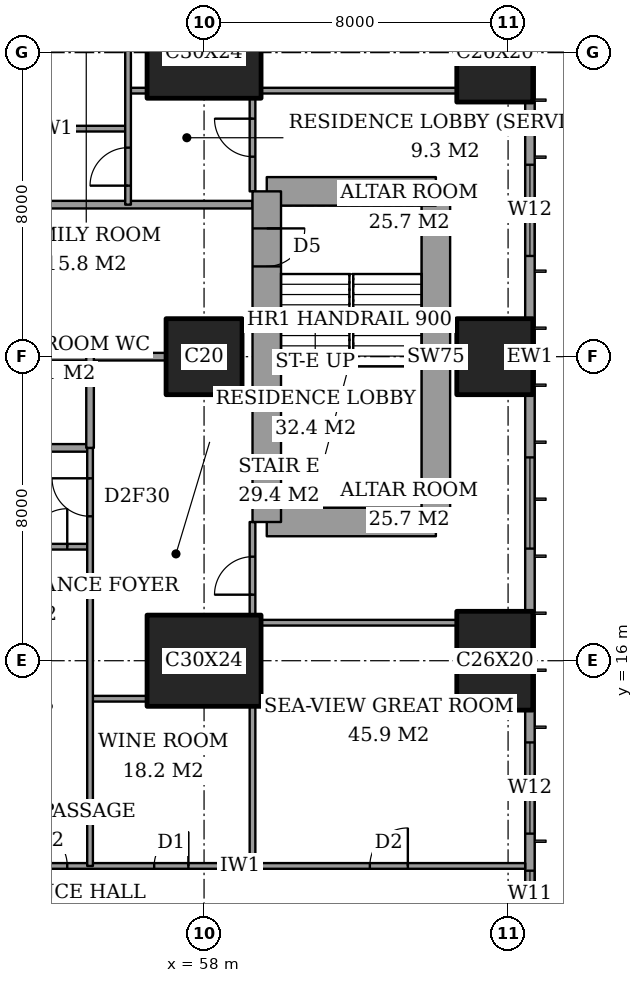
"""IFC4 building model, lengths in metres.
Left out: names, types, materials, properties, quantities, classifications, styles, units other than length and angle.
Written with IfcOpenShell. Run it as: python <this file> out.ifc"""

import sys

from ifc_helpers import new_model, si_unit, direction, frame, frame_2d, origin, origin_2d, place, context, subcontext, project, spatial, rectangle, extrude, element, fill, save


model = new_model("IFC4")
c1 = context("Model", 3, precision=1e-05, world=origin(), true_north=direction((0.0, 1.0)))
c2 = subcontext(c1, "Body", "Model", "MODEL_VIEW")
j1 = project(units=[si_unit("LENGTHUNIT", "METRE"), si_unit("PLANEANGLEUNIT", "RADIAN")], contexts=[c1])
p1 = place(None, origin())
s1 = spatial("IfcSite", under=j1, at=p1, CompositionType="ELEMENT")
p2 = place(p1, origin())
s2 = spatial("IfcBuilding", under=s1, at=p2, CompositionType="ELEMENT")
p3 = place(p2, frame((0.0, 0.0, 143.0)))
s3 = spatial("IfcBuildingStorey", under=s2, at=p3, CompositionType="ELEMENT", Elevation=143.0)
p4 = place(p3, frame((58.0, 16.0, 0.0), z_axis=(0.0, 0.0, 1.0), x_axis=(1.0, 0.0, 0.0)))
e1 = element("IfcColumn", 1, at=p4, inside=s3, PredefinedType="COLUMN", context=c2, shape_type="SweptSolid", body=[
    extrude(rectangle(XDim=3.0, YDim=2.4, at=origin_2d()), origin(), (0.0, 0.0, 1.0), 3.6),
])
p5 = place(p3, frame((58.0, 24.0, 0.0), z_axis=(0.0, 0.0, 1.0), x_axis=(1.0, 0.0, 0.0)))
e2 = element("IfcColumn", 2, at=p5, inside=s3, PredefinedType="COLUMN", context=c2, shape_type="SweptSolid", body=[
    extrude(rectangle(XDim=2.0, YDim=2.0, at=origin_2d()), origin(), (0.0, 0.0, 1.0), 3.6),
])
p6 = place(p3, frame((58.0, 32.0, 0.0), z_axis=(0.0, 0.0, 1.0), x_axis=(1.0, 0.0, 0.0)))
e3 = element("IfcColumn", 3, at=p6, inside=s3, PredefinedType="COLUMN", context=c2, shape_type="SweptSolid", body=[
    extrude(rectangle(XDim=3.0, YDim=2.4, at=origin_2d()), origin(), (0.0, 0.0, 1.0), 3.6),
])
p7 = place(p3, frame((65.65, 16.0, 0.0), z_axis=(0.0, 0.0, 1.0), x_axis=(0.0, 1.0, 0.0)))
e4 = element("IfcColumn", 4, at=p7, inside=s3, PredefinedType="COLUMN", context=c2, shape_type="SweptSolid", body=[
    extrude(rectangle(XDim=2.6, YDim=2.0, at=origin_2d()), origin(), (0.0, 0.0, 1.0), 3.6),
])
p8 = place(p3, frame((65.65, 24.0, 0.0), z_axis=(0.0, 0.0, 1.0), x_axis=(1.0, 0.0, 0.0)))
e5 = element("IfcColumn", 5, at=p8, inside=s3, PredefinedType="COLUMN", context=c2, shape_type="SweptSolid", body=[
    extrude(rectangle(XDim=2.0, YDim=2.0, at=origin_2d()), origin(), (0.0, 0.0, 1.0), 3.6),
])
p9 = place(p3, frame((65.65, 32.0, 0.0), z_axis=(0.0, 0.0, 1.0), x_axis=(0.0, 1.0, 0.0)))
e6 = element("IfcColumn", 6, at=p9, inside=s3, PredefinedType="COLUMN", context=c2, shape_type="SweptSolid", body=[
    extrude(rectangle(XDim=2.6, YDim=2.0, at=origin_2d()), origin(), (0.0, 0.0, 1.0), 3.6),
])
p10 = place(p3, frame((59.65, 19.65, 0.0), z_axis=(0.0, 0.0, 1.0), x_axis=(1.0, 0.0, 0.0)))
e7 = element("IfcWall", 7, at=p10, inside=s3, PredefinedType="SHEAR", context=c2, shape_type="SweptSolid", body=[
    extrude(rectangle(XDim=4.45, YDim=0.75, at=frame_2d((2.225, 0.0))), origin(), (0.0, 0.0, 1.0), 3.6),
])
p11 = place(p3, frame((64.1, 19.65, 0.0), z_axis=(0.0, 0.0, 1.0), x_axis=(0.0, 1.0, 0.0)))
e8 = element("IfcWall", 8, at=p11, inside=s3, PredefinedType="SHEAR", context=c2, shape_type="SweptSolid", body=[
    extrude(rectangle(XDim=8.7, YDim=0.75, at=frame_2d((4.35, 0.0))), origin(), (0.0, 0.0, 1.0), 3.6),
])
p12 = place(p3, frame((64.1, 28.35, 0.0), z_axis=(0.0, 0.0, 1.0), x_axis=(-1.0, 0.0, 0.0)))
e9 = element("IfcWall", 9, at=p12, inside=s3, PredefinedType="SHEAR", context=c2, shape_type="SweptSolid", body=[
    extrude(rectangle(XDim=4.45, YDim=0.75, at=frame_2d((2.225, 0.0))), origin(), (0.0, 0.0, 1.0), 3.6),
])
p13 = place(p3, frame((59.65, 28.35, 0.0), z_axis=(0.0, 0.0, 1.0), x_axis=(0.0, -1.0, 0.0)))
e10 = element("IfcWall", 10, at=p13, inside=s3, PredefinedType="SHEAR", context=c2, shape_type="SweptSolid", body=[
    extrude(rectangle(XDim=8.7, YDim=0.75, at=frame_2d((4.35, 0.0))), origin(), (0.0, 0.0, 1.0), 3.6),
])
p14 = place(p13, frame((0.975, 0.0, 0.0)))
e11 = element("IfcOpeningElement", 11, at=p14, cuts=e10, PredefinedType="OPENING", context=c2, shape_type="SweptSolid", body=[
    extrude(rectangle(XDim=1.0, YDim=2.1, at=frame_2d((0.5, 1.05))), frame((0.0, 0.385, 0.0), z_axis=(0.0, -1.0, 0.0), x_axis=(1.0, 0.0, 0.0)), (0.0, 0.0, 1.0), 0.77),
])
p15 = place(p3, frame((66.575, 3.175, 0.0), z_axis=(0.0, 0.0, 1.0), x_axis=(0.0, 1.0, 0.0)))
e12 = element("IfcWall", 12, at=p15, inside=s3, PredefinedType="SOLIDWALL", context=c2, shape_type="SweptSolid", body=[
    extrude(rectangle(XDim=41.65, YDim=0.25, at=frame_2d((20.825, 0.0))), origin(), (0.0, 0.0, 1.0), 3.6),
])
p16 = place(p15, frame((0.775, 0.0, 0.4)))
e13 = element("IfcOpeningElement", 13, at=p16, cuts=e12, PredefinedType="OPENING", context=c2, shape_type="SweptSolid", body=[
    extrude(rectangle(XDim=2.4, YDim=2.2, at=frame_2d((1.2, 1.1))), frame((0.0, 0.135, 0.0), z_axis=(0.0, -1.0, 0.0), x_axis=(1.0, 0.0, 0.0)), (0.0, 0.0, 1.0), 0.27),
])
p17 = place(p15, frame((6.1, 0.0, 0.4)))
e14 = element("IfcOpeningElement", 14, at=p17, cuts=e12, PredefinedType="OPENING", context=c2, shape_type="SweptSolid", body=[
    extrude(rectangle(XDim=1.2, YDim=2.2, at=frame_2d((0.6, 1.1))), frame((0.0, 0.135, 0.0), z_axis=(0.0, -1.0, 0.0), x_axis=(1.0, 0.0, 0.0)), (0.0, 0.0, 1.0), 0.27),
])
p18 = place(p15, frame((8.275, 0.0, 0.4)))
e15 = element("IfcOpeningElement", 15, at=p18, cuts=e12, PredefinedType="OPENING", context=c2, shape_type="SweptSolid", body=[
    extrude(rectangle(XDim=2.4, YDim=2.2, at=frame_2d((1.2, 1.1))), frame((0.0, 0.135, 0.0), z_axis=(0.0, -1.0, 0.0), x_axis=(1.0, 0.0, 0.0)), (0.0, 0.0, 1.0), 0.27),
])
p19 = place(p15, frame((15.775, 0.0, 0.4)))
e16 = element("IfcOpeningElement", 16, at=p19, cuts=e12, PredefinedType="OPENING", context=c2, shape_type="SweptSolid", body=[
    extrude(rectangle(XDim=2.4, YDim=2.2, at=frame_2d((1.2, 1.1))), frame((0.0, 0.135, 0.0), z_axis=(0.0, -1.0, 0.0), x_axis=(1.0, 0.0, 0.0)), (0.0, 0.0, 1.0), 0.27),
])
p20 = place(p15, frame((23.475, 0.0, 0.4)))
e17 = element("IfcOpeningElement", 17, at=p20, cuts=e12, PredefinedType="OPENING", context=c2, shape_type="SweptSolid", body=[
    extrude(rectangle(XDim=2.4, YDim=2.2, at=frame_2d((1.2, 1.1))), frame((0.0, 0.135, 0.0), z_axis=(0.0, -1.0, 0.0), x_axis=(1.0, 0.0, 0.0)), (0.0, 0.0, 1.0), 0.27),
])
p21 = place(p15, frame((30.875, 0.0, 0.4)))
e18 = element("IfcOpeningElement", 18, at=p21, cuts=e12, PredefinedType="OPENING", context=c2, shape_type="SweptSolid", body=[
    extrude(rectangle(XDim=2.4, YDim=2.2, at=frame_2d((1.2, 1.1))), frame((0.0, 0.135, 0.0), z_axis=(0.0, -1.0, 0.0), x_axis=(1.0, 0.0, 0.0)), (0.0, 0.0, 1.0), 0.27),
])
p22 = place(p15, frame((34.325, 0.0, 0.4)))
e19 = element("IfcOpeningElement", 19, at=p22, cuts=e12, PredefinedType="OPENING", context=c2, shape_type="SweptSolid", body=[
    extrude(rectangle(XDim=1.2, YDim=2.2, at=frame_2d((0.6, 1.1))), frame((0.0, 0.135, 0.0), z_axis=(0.0, -1.0, 0.0), x_axis=(1.0, 0.0, 0.0)), (0.0, 0.0, 1.0), 0.27),
])
p23 = place(p15, frame((38.475, 0.0, 0.4)))
e20 = element("IfcOpeningElement", 20, at=p23, cuts=e12, PredefinedType="OPENING", context=c2, shape_type="SweptSolid", body=[
    extrude(rectangle(XDim=2.4, YDim=2.2, at=frame_2d((1.2, 1.1))), frame((0.0, 0.135, 0.0), z_axis=(0.0, -1.0, 0.0), x_axis=(1.0, 0.0, 0.0)), (0.0, 0.0, 1.0), 0.27),
])
p24 = place(p3, frame((41.439, 10.6, 0.0), z_axis=(0.0, 0.0, 1.0), x_axis=(1.0, 0.0, 0.0)))
e21 = element("IfcWall", 21, at=p24, inside=s3, PredefinedType="PARTITIONING", context=c2, shape_type="SweptSolid", body=[
    extrude(rectangle(XDim=25.011, YDim=0.15, at=frame_2d((12.505, 0.0))), origin(), (0.0, 0.0, 1.0), 3.35),
])
p25 = place(p24, frame((11.961, 0.0, 0.0)))
e22 = element("IfcOpeningElement", 22, at=p25, cuts=e21, PredefinedType="OPENING", context=c2, shape_type="SweptSolid", body=[
    extrude(rectangle(XDim=1.0, YDim=2.1, at=frame_2d((0.5, 1.05))), frame((0.0, 0.085, 0.0), z_axis=(0.0, -1.0, 0.0), x_axis=(1.0, 0.0, 0.0)), (0.0, 0.0, 1.0), 0.17),
])
p26 = place(p24, frame((20.924, 0.0, 0.0)))
e23 = element("IfcOpeningElement", 23, at=p26, cuts=e21, PredefinedType="OPENING", context=c2, shape_type="SweptSolid", body=[
    extrude(rectangle(XDim=1.0, YDim=2.1, at=frame_2d((0.5, 1.05))), frame((0.0, 0.085, 0.0), z_axis=(0.0, -1.0, 0.0), x_axis=(1.0, 0.0, 0.0)), (0.0, 0.0, 1.0), 0.17),
])
p27 = place(p24, frame((15.249, 0.0, 0.0)))
e24 = element("IfcOpeningElement", 24, at=p27, cuts=e21, PredefinedType="OPENING", context=c2, shape_type="SweptSolid", body=[
    extrude(rectangle(XDim=0.9, YDim=2.1, at=frame_2d((0.45, 1.05))), frame((0.0, 0.085, 0.0), z_axis=(0.0, -1.0, 0.0), x_axis=(1.0, 0.0, 0.0)), (0.0, 0.0, 1.0), 0.17),
])
p28 = place(p24, frame((9.661, 0.0, 0.0)))
e25 = element("IfcOpeningElement", 25, at=p28, cuts=e21, PredefinedType="OPENING", context=c2, shape_type="SweptSolid", body=[
    extrude(rectangle(XDim=1.0, YDim=2.1, at=frame_2d((0.5, 1.05))), frame((0.0, 0.085, 0.0), z_axis=(0.0, -1.0, 0.0), x_axis=(1.0, 0.0, 0.0)), (0.0, 0.0, 1.0), 0.17),
])
p29 = place(p24, frame((7.311, 0.0, 0.0)))
e26 = element("IfcOpeningElement", 26, at=p29, cuts=e21, PredefinedType="OPENING", context=c2, shape_type="SweptSolid", body=[
    extrude(rectangle(XDim=0.9, YDim=2.1, at=frame_2d((0.45, 1.05))), frame((0.0, 0.085, 0.0), z_axis=(0.0, -1.0, 0.0), x_axis=(1.0, 0.0, 0.0)), (0.0, 0.0, 1.0), 0.17),
])
p30 = place(p24, frame((2.836, 0.0, 0.0)))
e27 = element("IfcOpeningElement", 27, at=p30, cuts=e21, PredefinedType="OPENING", context=c2, shape_type="SweptSolid", body=[
    extrude(rectangle(XDim=1.0, YDim=2.1, at=frame_2d((0.5, 1.05))), frame((0.0, 0.085, 0.0), z_axis=(0.0, -1.0, 0.0), x_axis=(1.0, 0.0, 0.0)), (0.0, 0.0, 1.0), 0.17),
])
p31 = place(p3, frame((55.0, 15.0, 0.0), z_axis=(0.0, 0.0, 1.0), x_axis=(1.0, 0.0, 0.0)))
e28 = element("IfcWall", 28, at=p31, inside=s3, PredefinedType="PARTITIONING", context=c2, shape_type="SweptSolid", body=[
    extrude(rectangle(XDim=1.5, YDim=0.15, at=frame_2d((0.75, 0.0))), origin(), (0.0, 0.0, 1.0), 3.35),
])
p32 = place(p3, frame((59.5, 17.0, 0.0), z_axis=(0.0, 0.0, 1.0), x_axis=(1.0, 0.0, 0.0)))
e29 = element("IfcWall", 29, at=p32, inside=s3, PredefinedType="PARTITIONING", context=c2, shape_type="SweptSolid", body=[
    extrude(rectangle(XDim=5.15, YDim=0.15, at=frame_2d((2.575, 0.0))), origin(), (0.0, 0.0, 1.0), 3.35),
])
p33 = place(p3, frame((51.6, 19.0, 0.0), z_axis=(0.0, 0.0, 1.0), x_axis=(1.0, 0.0, 0.0)))
e30 = element("IfcWall", 30, at=p33, inside=s3, PredefinedType="PARTITIONING", context=c2, shape_type="SweptSolid", body=[
    extrude(rectangle(XDim=3.4, YDim=0.15, at=frame_2d((1.7, 0.0))), origin(), (0.0, 0.0, 1.0), 3.35),
])
p34 = place(p33, frame((1.8, 0.0, 0.0)))
e31 = element("IfcOpeningElement", 31, at=p34, cuts=e30, PredefinedType="OPENING", context=c2, shape_type="SweptSolid", body=[
    extrude(rectangle(XDim=1.0, YDim=2.1, at=frame_2d((0.5, 1.05))), frame((0.0, 0.085, 0.0), z_axis=(0.0, -1.0, 0.0), x_axis=(1.0, 0.0, 0.0)), (0.0, 0.0, 1.0), 0.17),
])
p35 = place(p3, frame((51.2, 21.6, 0.0), z_axis=(0.0, 0.0, 1.0), x_axis=(1.0, 0.0, 0.0)))
e32 = element("IfcWall", 32, at=p35, inside=s3, PredefinedType="PARTITIONING", context=c2, shape_type="SweptSolid", body=[
    extrude(rectangle(XDim=3.8, YDim=0.2, at=frame_2d((1.9, 0.0))), origin(), (0.0, 0.0, 1.0), 3.35),
])
p36 = place(p35, frame((1.45, 0.0, 0.0)))
e33 = element("IfcOpeningElement", 33, at=p36, cuts=e32, PredefinedType="OPENING", context=c2, shape_type="SweptSolid", body=[
    extrude(rectangle(XDim=0.9, YDim=2.1, at=frame_2d((0.45, 1.05))), frame((0.0, 0.11, 0.0), z_axis=(0.0, -1.0, 0.0), x_axis=(1.0, 0.0, 0.0)), (0.0, 0.0, 1.0), 0.22),
])
p37 = place(p3, frame((51.0, 24.0, 0.0), z_axis=(0.0, 0.0, 1.0), x_axis=(1.0, 0.0, 0.0)))
e34 = element("IfcWall", 34, at=p37, inside=s3, PredefinedType="PARTITIONING", context=c2, shape_type="SweptSolid", body=[
    extrude(rectangle(XDim=6.0, YDim=0.2, at=frame_2d((3.0, 0.0))), origin(), (0.0, 0.0, 1.0), 3.35),
])
p38 = place(p3, frame((42.0, 28.0, 0.0), z_axis=(0.0, 0.0, 1.0), x_axis=(1.0, 0.0, 0.0)))
e35 = element("IfcWall", 35, at=p38, inside=s3, PredefinedType="PARTITIONING", context=c2, shape_type="SweptSolid", body=[
    extrude(rectangle(XDim=17.275, YDim=0.2, at=frame_2d((8.637, 0.0))), origin(), (0.0, 0.0, 1.0), 3.35),
])
p39 = place(p38, frame((9.4, 0.0, 0.0)))
e36 = element("IfcOpeningElement", 36, at=p39, cuts=e35, PredefinedType="OPENING", context=c2, shape_type="SweptSolid", body=[
    extrude(rectangle(XDim=1.2, YDim=2.4, at=frame_2d((0.6, 1.2))), frame((0.0, 0.11, 0.0), z_axis=(0.0, -1.0, 0.0), x_axis=(1.0, 0.0, 0.0)), (0.0, 0.0, 1.0), 0.22),
])
p40 = place(p3, frame((51.6, 30.0, 0.0), z_axis=(0.0, 0.0, 1.0), x_axis=(1.0, 0.0, 0.0)))
e37 = element("IfcWall", 37, at=p40, inside=s3, PredefinedType="PARTITIONING", context=c2, shape_type="SweptSolid", body=[
    extrude(rectangle(XDim=4.4, YDim=0.15, at=frame_2d((2.2, 0.0))), origin(), (0.0, 0.0, 1.0), 3.35),
])
p41 = place(p40, frame((0.6, 0.0, 0.0)))
e38 = element("IfcOpeningElement", 38, at=p41, cuts=e37, PredefinedType="OPENING", context=c2, shape_type="SweptSolid", body=[
    extrude(rectangle(XDim=1.0, YDim=2.1, at=frame_2d((0.5, 1.05))), frame((0.0, 0.085, 0.0), z_axis=(0.0, -1.0, 0.0), x_axis=(1.0, 0.0, 0.0)), (0.0, 0.0, 1.0), 0.17),
])
p42 = place(p3, frame((56.0, 31.0, 0.0), z_axis=(0.0, 0.0, 1.0), x_axis=(1.0, 0.0, 0.0)))
e39 = element("IfcWall", 39, at=p42, inside=s3, PredefinedType="PARTITIONING", context=c2, shape_type="SweptSolid", body=[
    extrude(rectangle(XDim=0.5, YDim=0.15, at=frame_2d((0.25, 0.0))), origin(), (0.0, 0.0, 1.0), 3.35),
])
p43 = place(p3, frame((59.5, 31.0, 0.0), z_axis=(0.0, 0.0, 1.0), x_axis=(1.0, 0.0, 0.0)))
e40 = element("IfcWall", 40, at=p43, inside=s3, PredefinedType="PARTITIONING", context=c2, shape_type="SweptSolid", body=[
    extrude(rectangle(XDim=5.15, YDim=0.15, at=frame_2d((2.575, 0.0))), origin(), (0.0, 0.0, 1.0), 3.35),
])
p44 = place(p3, frame((55.0, 21.6, 0.0), z_axis=(0.0, 0.0, 1.0), x_axis=(0.0, 1.0, 0.0)))
e41 = element("IfcWall", 41, at=p44, inside=s3, PredefinedType="PARTITIONING", context=c2, shape_type="SweptSolid", body=[
    extrude(rectangle(XDim=2.4, YDim=0.2, at=frame_2d((1.2, 0.0))), origin(), (0.0, 0.0, 1.0), 3.35),
])
p45 = place(p3, frame((55.0, 10.6, 0.0), z_axis=(0.0, 0.0, 1.0), x_axis=(0.0, 1.0, 0.0)))
e42 = element("IfcWall", 42, at=p45, inside=s3, PredefinedType="PARTITIONING", context=c2, shape_type="SweptSolid", body=[
    extrude(rectangle(XDim=11.0, YDim=0.15, at=frame_2d((5.5, 0.0))), origin(), (0.0, 0.0, 1.0), 3.35),
])
p46 = place(p45, frame((9.2, 0.0, 0.0)))
e43 = element("IfcOpeningElement", 43, at=p46, cuts=e42, PredefinedType="OPENING", context=c2, shape_type="SweptSolid", body=[
    extrude(rectangle(XDim=1.0, YDim=2.1, at=frame_2d((0.5, 1.05))), frame((0.0, 0.085, 0.0), z_axis=(0.0, -1.0, 0.0), x_axis=(1.0, 0.0, 0.0)), (0.0, 0.0, 1.0), 0.17),
])
p47 = place(p3, frame((56.0, 28.0, 0.0), z_axis=(0.0, 0.0, 1.0), x_axis=(0.0, 1.0, 0.0)))
e44 = element("IfcWall", 44, at=p47, inside=s3, PredefinedType="PARTITIONING", context=c2, shape_type="SweptSolid", body=[
    extrude(rectangle(XDim=9.2, YDim=0.15, at=frame_2d((4.6, 0.0))), origin(), (0.0, 0.0, 1.0), 3.35),
])
p48 = place(p47, frame((0.5, 0.0, 0.0)))
e45 = element("IfcOpeningElement", 45, at=p48, cuts=e44, PredefinedType="OPENING", context=c2, shape_type="SweptSolid", body=[
    extrude(rectangle(XDim=1.0, YDim=2.1, at=frame_2d((0.5, 1.05))), frame((0.0, 0.085, 0.0), z_axis=(0.0, -1.0, 0.0), x_axis=(1.0, 0.0, 0.0)), (0.0, 0.0, 1.0), 0.17),
])
p49 = place(p3, frame((59.275, 10.6, 0.0), z_axis=(0.0, 0.0, 1.0), x_axis=(0.0, 1.0, 0.0)))
e46 = element("IfcWall", 46, at=p49, inside=s3, PredefinedType="PARTITIONING", context=c2, shape_type="SweptSolid", body=[
    extrude(rectangle(XDim=4.2, YDim=0.15, at=frame_2d((2.1, 0.0))), origin(), (0.0, 0.0, 1.0), 3.35),
])
p50 = place(p3, frame((59.275, 17.2, 0.0), z_axis=(0.0, 0.0, 1.0), x_axis=(0.0, 1.0, 0.0)))
e47 = element("IfcWall", 47, at=p50, inside=s3, PredefinedType="PARTITIONING", context=c2, shape_type="SweptSolid", body=[
    extrude(rectangle(XDim=2.45, YDim=0.15, at=frame_2d((1.225, 0.0))), origin(), (0.0, 0.0, 1.0), 3.35),
])
p51 = place(p50, frame((0.538, 0.0, 0.0)))
e48 = element("IfcOpeningElement", 48, at=p51, cuts=e47, PredefinedType="OPENING", context=c2, shape_type="SweptSolid", body=[
    extrude(rectangle(XDim=1.0, YDim=2.1, at=frame_2d((0.5, 1.05))), frame((0.0, 0.085, 0.0), z_axis=(0.0, -1.0, 0.0), x_axis=(1.0, 0.0, 0.0)), (0.0, 0.0, 1.0), 0.17),
])
p52 = place(p3, frame((59.275, 28.35, 0.0), z_axis=(0.0, 0.0, 1.0), x_axis=(0.0, 1.0, 0.0)))
e49 = element("IfcWall", 49, at=p52, inside=s3, PredefinedType="PARTITIONING", context=c2, shape_type="SweptSolid", body=[
    extrude(rectangle(XDim=2.45, YDim=0.15, at=frame_2d((1.225, 0.0))), origin(), (0.0, 0.0, 1.0), 3.35),
])
p53 = place(p52, frame((0.913, 0.0, 0.0)))
e50 = element("IfcOpeningElement", 50, at=p53, cuts=e49, PredefinedType="OPENING", context=c2, shape_type="SweptSolid", body=[
    extrude(rectangle(XDim=1.0, YDim=2.1, at=frame_2d((0.5, 1.05))), frame((0.0, 0.085, 0.0), z_axis=(0.0, -1.0, 0.0), x_axis=(1.0, 0.0, 0.0)), (0.0, 0.0, 1.0), 0.17),
])
p54 = place(p17, origin())
e51 = element("IfcWindow", 51, at=p54, inside=s3, PartitioningType="SINGLE_PANEL", PredefinedType="WINDOW", context=c2, shape_type="SweptSolid", body=[
    extrude(rectangle(XDim=1.2, YDim=2.2, at=frame_2d((0.6, 1.1))), frame((0.0, 0.03, 0.0), z_axis=(0.0, -1.0, 0.0), x_axis=(1.0, 0.0, 0.0)), (0.0, 0.0, 1.0), 0.06),
])
fill(e14, e51)
p55 = place(p18, origin())
e52 = element("IfcWindow", 52, at=p55, inside=s3, PartitioningType="SINGLE_PANEL", PredefinedType="WINDOW", context=c2, shape_type="SweptSolid", body=[
    extrude(rectangle(XDim=2.4, YDim=2.2, at=frame_2d((1.2, 1.1))), frame((0.0, 0.03, 0.0), z_axis=(0.0, -1.0, 0.0), x_axis=(1.0, 0.0, 0.0)), (0.0, 0.0, 1.0), 0.06),
])
fill(e15, e52)
p56 = place(p19, origin())
e53 = element("IfcWindow", 53, at=p56, inside=s3, PartitioningType="SINGLE_PANEL", PredefinedType="WINDOW", context=c2, shape_type="SweptSolid", body=[
    extrude(rectangle(XDim=2.4, YDim=2.2, at=frame_2d((1.2, 1.1))), frame((0.0, 0.03, 0.0), z_axis=(0.0, -1.0, 0.0), x_axis=(1.0, 0.0, 0.0)), (0.0, 0.0, 1.0), 0.06),
])
fill(e16, e53)
p57 = place(p20, origin())
e54 = element("IfcWindow", 54, at=p57, inside=s3, PartitioningType="SINGLE_PANEL", PredefinedType="WINDOW", context=c2, shape_type="SweptSolid", body=[
    extrude(rectangle(XDim=2.4, YDim=2.2, at=frame_2d((1.2, 1.1))), frame((0.0, 0.03, 0.0), z_axis=(0.0, -1.0, 0.0), x_axis=(1.0, 0.0, 0.0)), (0.0, 0.0, 1.0), 0.06),
])
fill(e17, e54)
p58 = place(p25, origin())
e55 = element("IfcDoor", 55, at=p58, inside=s3, OperationType="SINGLE_SWING_RIGHT", PredefinedType="DOOR", context=c2, shape_type="SweptSolid", body=[
    extrude(rectangle(XDim=1.0, YDim=2.1, at=frame_2d((0.5, 1.05))), frame((0.0, 0.025, 0.0), z_axis=(0.0, -1.0, 0.0), x_axis=(1.0, 0.0, 0.0)), (0.0, 0.0, 1.0), 0.05),
])
fill(e22, e55)
p59 = place(p26, origin())
e56 = element("IfcDoor", 56, at=p59, inside=s3, OperationType="SINGLE_SWING_LEFT", PredefinedType="DOOR", context=c2, shape_type="SweptSolid", body=[
    extrude(rectangle(XDim=1.0, YDim=2.1, at=frame_2d((0.5, 1.05))), frame((0.0, 0.025, 0.0), z_axis=(0.0, -1.0, 0.0), x_axis=(1.0, 0.0, 0.0)), (0.0, 0.0, 1.0), 0.05),
])
fill(e23, e56)
p60 = place(p51, origin())
e57 = element("IfcDoor", 57, at=p60, inside=s3, OperationType="SINGLE_SWING_RIGHT", PredefinedType="DOOR", context=c2, shape_type="SweptSolid", body=[
    extrude(rectangle(XDim=1.0, YDim=2.1, at=frame_2d((0.5, 1.05))), frame((0.0, 0.025, 0.0), z_axis=(0.0, -1.0, 0.0), x_axis=(1.0, 0.0, 0.0)), (0.0, 0.0, 1.0), 0.05),
])
fill(e48, e57)
p61 = place(p27, origin())
e58 = element("IfcDoor", 58, at=p61, inside=s3, OperationType="SINGLE_SWING_LEFT", PredefinedType="DOOR", context=c2, shape_type="SweptSolid", body=[
    extrude(rectangle(XDim=0.9, YDim=2.1, at=frame_2d((0.45, 1.05))), frame((0.0, 0.025, 0.0), z_axis=(0.0, -1.0, 0.0), x_axis=(1.0, 0.0, 0.0)), (0.0, 0.0, 1.0), 0.05),
])
fill(e24, e58)
p62 = place(p46, origin())
e59 = element("IfcDoor", 59, at=p62, inside=s3, OperationType="SINGLE_SWING_LEFT", PredefinedType="DOOR", context=c2, shape_type="SweptSolid", body=[
    extrude(rectangle(XDim=1.0, YDim=2.1, at=frame_2d((0.5, 1.05))), frame((0.0, 0.025, 0.0), z_axis=(0.0, -1.0, 0.0), x_axis=(1.0, 0.0, 0.0)), (0.0, 0.0, 1.0), 0.05),
])
fill(e43, e59)
p63 = place(p34, origin())
e60 = element("IfcDoor", 60, at=p63, inside=s3, OperationType="SINGLE_SWING_LEFT", PredefinedType="DOOR", context=c2, shape_type="SweptSolid", body=[
    extrude(rectangle(XDim=1.0, YDim=2.1, at=frame_2d((0.5, 1.05))), frame((0.0, 0.025, 0.0), z_axis=(0.0, -1.0, 0.0), x_axis=(1.0, 0.0, 0.0)), (0.0, 0.0, 1.0), 0.05),
])
fill(e31, e60)
p64 = place(p53, origin())
e61 = element("IfcDoor", 61, at=p64, inside=s3, OperationType="SINGLE_SWING_LEFT", PredefinedType="DOOR", context=c2, shape_type="SweptSolid", body=[
    extrude(rectangle(XDim=1.0, YDim=2.1, at=frame_2d((0.5, 1.05))), frame((0.0, 0.025, 0.0), z_axis=(0.0, -1.0, 0.0), x_axis=(1.0, 0.0, 0.0)), (0.0, 0.0, 1.0), 0.05),
])
fill(e50, e61)
p65 = place(p48, origin())
e62 = element("IfcDoor", 62, at=p65, inside=s3, OperationType="SINGLE_SWING_RIGHT", PredefinedType="DOOR", context=c2, shape_type="SweptSolid", body=[
    extrude(rectangle(XDim=1.0, YDim=2.1, at=frame_2d((0.5, 1.05))), frame((0.0, 0.025, 0.0), z_axis=(0.0, -1.0, 0.0), x_axis=(1.0, 0.0, 0.0)), (0.0, 0.0, 1.0), 0.05),
])
fill(e45, e62)
p66 = place(p14, origin())
e63 = element("IfcDoor", 63, at=p66, inside=s3, OperationType="SINGLE_SWING_RIGHT", PredefinedType="DOOR", context=c2, shape_type="SweptSolid", body=[
    extrude(rectangle(XDim=1.0, YDim=2.1, at=frame_2d((0.5, 1.05))), frame((0.0, 0.025, 0.0), z_axis=(0.0, -1.0, 0.0), x_axis=(1.0, 0.0, 0.0)), (0.0, 0.0, 1.0), 0.05),
])
fill(e11, e63)
save(model, sys.argv[1])
